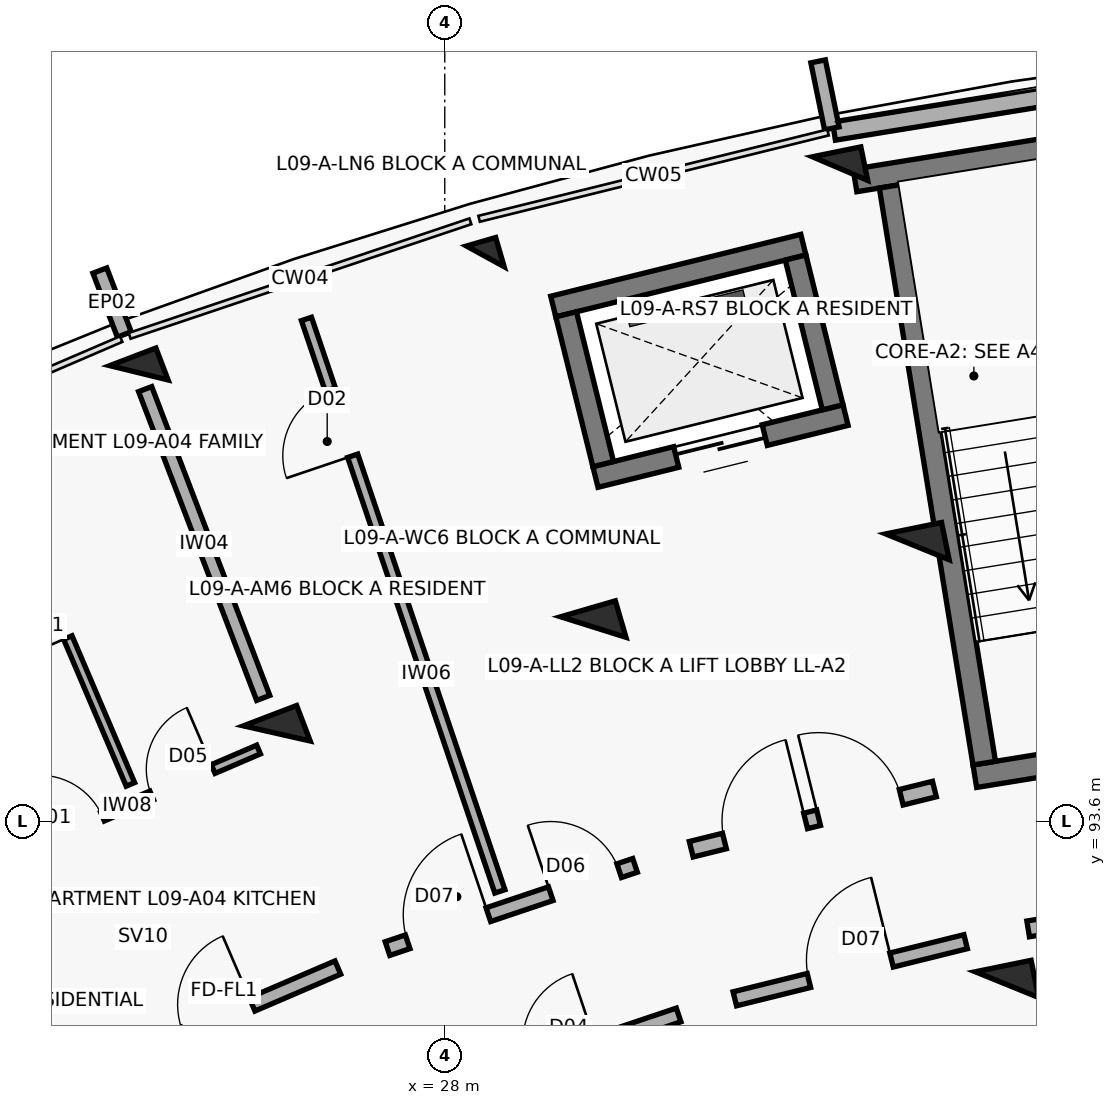
"""IFC4 building model, lengths in metres.
Left out: names, types, materials, properties, quantities, classifications, styles, units other than length and angle.
Written with IfcOpenShell. Run it as: python <this file> out.ifc"""

import sys

from ifc_helpers import new_model, si_unit, direction, frame, frame_2d, origin, origin_2d, place, context, subcontext, project, spatial, rectangle, extrude, element, fill, save


model = new_model("IFC4")
c1 = context("Model", 3, precision=1e-05, world=origin(), true_north=direction((0.0, 1.0)))
c2 = subcontext(c1, "Body", "Model", "MODEL_VIEW")
j1 = project(units=[si_unit("LENGTHUNIT", "METRE"), si_unit("PLANEANGLEUNIT", "RADIAN")], contexts=[c1])
p1 = place(None, origin())
s1 = spatial("IfcSite", under=j1, at=p1, CompositionType="ELEMENT")
p2 = place(p1, origin())
s2 = spatial("IfcBuilding", under=s1, at=p2, CompositionType="ELEMENT")
p3 = place(p2, frame((0.0, 0.0, 29.8)))
s3 = spatial("IfcBuildingStorey", under=s2, at=p3, CompositionType="ELEMENT", Elevation=29.8)
p4 = place(p3, frame((25.79, 94.753, 0.0), z_axis=(0.0, 0.0, 1.0), x_axis=(-0.357064076459, 0.934079892355, 0.0)))
e1 = element("IfcColumn", 1, at=p4, inside=s3, PredefinedType="COLUMN", context=c2, shape_type="SweptSolid", body=[
    extrude(rectangle(XDim=0.5, YDim=0.75, at=origin_2d()), origin(), (0.0, 0.0, 1.0), 3.1),
])
p5 = place(p3, frame((23.976, 99.499, 0.0), z_axis=(0.0, 0.0, 1.0), x_axis=(-0.357064076459, 0.934079892355, 0.0)))
e2 = element("IfcColumn", 2, at=p5, inside=s3, PredefinedType="COLUMN", context=c2, shape_type="SweptSolid", body=[
    extrude(rectangle(XDim=0.45, YDim=0.65, at=origin_2d()), origin(), (0.0, 0.0, 1.0), 3.1),
])
p6 = place(p3, frame((29.954, 96.153, 0.0), z_axis=(0.0, 0.0, 1.0), x_axis=(-0.27966144946, 0.96009867914, 0.0)))
e3 = element("IfcColumn", 3, at=p6, inside=s3, PredefinedType="COLUMN", context=c2, shape_type="SweptSolid", body=[
    extrude(rectangle(XDim=0.5, YDim=0.75, at=origin_2d()), origin(), (0.0, 0.0, 1.0), 3.1),
])
p7 = place(p3, frame((28.533, 101.031, 0.0), z_axis=(0.0, 0.0, 1.0), x_axis=(-0.27966144946, 0.96009867914, 0.0)))
e4 = element("IfcColumn", 4, at=p7, inside=s3, PredefinedType="COLUMN", context=c2, shape_type="SweptSolid", body=[
    extrude(rectangle(XDim=0.4, YDim=0.4, at=origin_2d()), origin(), (0.0, 0.0, 1.0), 3.1),
])
for number, where, z_axis, x_axis in (
    (5, (35.397, 91.448, 0.0), (0.0, 0.0, 1.0), (-0.2, 0.98, 0.0)),
    (6, (34.219, 97.209, 0.0), (0.0, 0.0, 1.0), (-0.2, 0.98, 0.0)),
):
    element("IfcColumn", number, at=place(p3, frame(where, z_axis=z_axis, x_axis=x_axis)), inside=s3, PredefinedType="COLUMN", context=c2, shape_type="SweptSolid", body=[
        extrude(rectangle(XDim=0.5, YDim=0.75, at=origin_2d()), origin(), (0.0, 0.0, 1.0), 3.1),
    ])
p8 = place(p3, frame((33.201, 102.186, 0.0), z_axis=(0.0, 0.0, 1.0), x_axis=(-0.200393999665, 0.979715389742, 0.0)))
e7 = element("IfcColumn", 7, at=p8, inside=s3, PredefinedType="COLUMN", context=c2, shape_type="SweptSolid", body=[
    extrude(rectangle(XDim=0.45, YDim=0.65, at=origin_2d()), origin(), (0.0, 0.0, 1.0), 3.1),
])
p9 = place(p3, frame((23.783, 100.003, 0.0), z_axis=(0.0, 0.0, 1.0), x_axis=(-0.356942580168, 0.934126326823, 0.0)))
e8 = element("IfcWall", 8, at=p9, inside=s3, PredefinedType="PARAPET", context=c2, shape_type="SweptSolid", body=[
    extrude(rectangle(XDim=0.9, YDim=0.195, at=frame_2d((0.45, 0.0))), origin(), (0.0, 0.0, 1.0), 2.25),
])
p10 = place(p3, frame((33.12, 102.679, 0.0), z_axis=(0.0, 0.0, 1.0), x_axis=(0.987080750493, 0.160223568819, 0.0)))
e9 = element("IfcWall", 9, at=p10, inside=s3, PredefinedType="SOLIDWALL", context=c2, shape_type="SweptSolid", body=[
    extrude(rectangle(XDim=4.809, YDim=0.242, at=frame_2d((2.404, 0.0))), origin(), (0.0, 0.0, 1.0), 2.25),
])
p11 = place(p3, frame((33.093, 102.715, 0.0), z_axis=(0.0, 0.0, 1.0), x_axis=(-0.200183211319, 0.979758481416, 0.0)))
e10 = element("IfcWall", 10, at=p11, inside=s3, PredefinedType="PARAPET", context=c2, shape_type="SweptSolid", body=[
    extrude(rectangle(XDim=0.9, YDim=0.195, at=frame_2d((0.45, 0.0))), origin(), (0.0, 0.0, 1.0), 2.25),
])
p12 = place(p3, frame((38.794, 94.811, 0.0), z_axis=(0.0, 0.0, 1.0), x_axis=(-0.987077443397, -0.160243941341, 0.0)))
e11 = element("IfcWall", 11, at=p12, inside=s3, PredefinedType="SHEAR", context=c2, shape_type="SweptSolid", body=[
    extrude(rectangle(XDim=3.87, YDim=0.3, at=frame_2d((1.935, 0.0))), origin(), (0.0, 0.0, 1.0), 3.1),
])
p13 = place(p12, frame((1.435, 0.0, 0.0)))
e12 = element("IfcOpeningElement", 12, at=p13, cuts=e11, PredefinedType="OPENING", context=c2, shape_type="SweptSolid", body=[
    extrude(rectangle(XDim=1.0, YDim=2.15, at=frame_2d((0.5, 1.075))), frame((0.0, 0.16, 0.0), z_axis=(0.0, -1.0, 0.0), x_axis=(1.0, 0.0, 0.0)), (0.0, 0.0, 1.0), 0.32),
])
p14 = place(p3, frame((37.81, 102.745, 0.0), z_axis=(0.0, 0.0, 1.0), x_axis=(-0.987084710126, -0.160199173019, 0.0)))
e13 = element("IfcWall", 13, at=p14, inside=s3, PredefinedType="SHEAR", context=c2, shape_type="SweptSolid", body=[
    extrude(rectangle(XDim=4.47, YDim=0.3, at=frame_2d((2.235, 0.0))), origin(), (0.0, 0.0, 1.0), 3.1),
])
p15 = place(p3, frame((35.098, 94.363, 0.0), z_axis=(0.0, 0.0, 1.0), x_axis=(-0.160227496777, 0.987080112897, 0.0)))
e14 = element("IfcWall", 14, at=p15, inside=s3, PredefinedType="SHEAR", context=c2, shape_type="SweptSolid", body=[
    extrude(rectangle(XDim=7.69, YDim=0.3, at=frame_2d((3.845, 0.0))), origin(), (0.0, 0.0, 1.0), 3.1),
])
p16 = place(p3, frame((33.273, 98.942, 0.0), z_axis=(0.0, 0.0, 1.0), x_axis=(-0.970707542441, -0.240264160972, 0.0)))
e15 = element("IfcWall", 15, at=p16, inside=s3, PredefinedType="SHEAR", context=c2, shape_type="SweptSolid", body=[
    extrude(rectangle(XDim=3.39, YDim=0.28, at=frame_2d((1.695, 0.0))), origin(), (0.0, 0.0, 1.0), 3.1),
])
p17 = place(p16, frame((1.095, 0.0, 0.0)))
e16 = element("IfcOpeningElement", 16, at=p17, cuts=e15, PredefinedType="OPENING", context=c2, shape_type="SweptSolid", body=[
    extrude(rectangle(XDim=1.2, YDim=2.15, at=frame_2d((0.6, 1.075))), frame((0.0, 0.15, 0.0), z_axis=(0.0, -1.0, 0.0), x_axis=(1.0, 0.0, 0.0)), (0.0, 0.0, 1.0), 0.3),
])
p18 = place(p3, frame((32.718, 101.185, 0.0), z_axis=(0.0, 0.0, 1.0), x_axis=(-0.970711699588, -0.240247364777, 0.0)))
e17 = element("IfcWall", 17, at=p18, inside=s3, PredefinedType="SHEAR", context=c2, shape_type="SweptSolid", body=[
    extrude(rectangle(XDim=3.39, YDim=0.28, at=frame_2d((1.695, 0.0))), origin(), (0.0, 0.0, 1.0), 3.1),
])
p19 = place(p3, frame((33.104, 99.044, 0.0), z_axis=(0.0, 0.0, 1.0), x_axis=(-0.240186044774, 0.970726873995, 0.0)))
e18 = element("IfcWall", 18, at=p19, inside=s3, PredefinedType="SHEAR", context=c2, shape_type="SweptSolid", body=[
    extrude(rectangle(XDim=2.03, YDim=0.28, at=frame_2d((1.015, 0.0))), origin(), (0.0, 0.0, 1.0), 3.1),
])
p20 = place(p3, frame((30.085, 98.297, 0.0), z_axis=(0.0, 0.0, 1.0), x_axis=(-0.2402993748, 0.970698825832, 0.0)))
e19 = element("IfcWall", 19, at=p20, inside=s3, PredefinedType="SHEAR", context=c2, shape_type="SweptSolid", body=[
    extrude(rectangle(XDim=2.03, YDim=0.28, at=frame_2d((1.015, 0.0))), origin(), (0.0, 0.0, 1.0), 3.1),
])
p21 = place(p3, frame((23.437, 90.316, 0.0), z_axis=(0.0, 0.0, 1.0), x_axis=(0.918718172399, 0.394913813008, 0.0)))
e20 = element("IfcWall", 20, at=p21, inside=s3, PredefinedType="SOLIDWALL", context=c2, shape_type="SweptSolid", body=[
    extrude(rectangle(XDim=3.436, YDim=0.19, at=frame_2d((1.718, 0.0))), origin(), (0.0, 0.0, 1.0), 2.08),
])
p22 = place(p21, frame((1.228, 0.0, 0.0)))
e21 = element("IfcOpeningElement", 21, at=p22, cuts=e20, PredefinedType="OPENING", context=c2, shape_type="SweptSolid", body=[
    extrude(rectangle(XDim=0.98, YDim=2.15, at=frame_2d((0.49, 1.075))), frame((0.0, 0.105, 0.0), z_axis=(0.0, -1.0, 0.0), x_axis=(1.0, 0.0, 0.0)), (0.0, 0.0, 1.0), 0.21),
])
p23 = place(p3, frame((22.073, 93.047, 0.0), z_axis=(0.0, 0.0, 1.0), x_axis=(0.918737522346, 0.394868794707, 0.0)))
e22 = element("IfcWall", 22, at=p23, inside=s3, PredefinedType="PARTITIONING", context=c2, shape_type="SweptSolid", body=[
    extrude(rectangle(XDim=3.785, YDim=0.125, at=frame_2d((1.893, 0.0))), origin(), (0.0, 0.0, 1.0), 2.08),
])
p24 = place(p23, frame((0.65, 0.0, 0.0)))
e23 = element("IfcOpeningElement", 23, at=p24, cuts=e22, PredefinedType="OPENING", context=c2, shape_type="SweptSolid", body=[
    extrude(rectangle(XDim=0.9, YDim=2.1, at=frame_2d((0.45, 1.05))), frame((0.0, 0.073, 0.0), z_axis=(0.0, -1.0, 0.0), x_axis=(1.0, 0.0, 0.0)), (0.0, 0.0, 1.0), 0.145),
])
p25 = place(p23, frame((2.255, 0.0, 0.0)))
e24 = element("IfcOpeningElement", 24, at=p25, cuts=e22, PredefinedType="OPENING", context=c2, shape_type="SweptSolid", body=[
    extrude(rectangle(XDim=0.88, YDim=2.1, at=frame_2d((0.44, 1.05))), frame((0.0, 0.073, 0.0), z_axis=(0.0, -1.0, 0.0), x_axis=(1.0, 0.0, 0.0)), (0.0, 0.0, 1.0), 0.145),
])
p26 = place(p3, frame((23.864, 94.083, 0.0), z_axis=(0.0, 0.0, 1.0), x_axis=(-0.392109841969, 0.919918404985, 0.0)))
e25 = element("IfcWall", 25, at=p26, inside=s3, PredefinedType="PARTITIONING", context=c2, shape_type="SweptSolid", body=[
    extrude(rectangle(XDim=5.05, YDim=0.12, at=frame_2d((2.525, 0.0))), origin(), (0.0, 0.0, 1.0), 2.08),
])
p27 = place(p26, frame((2.1, 0.0, 0.0)))
e26 = element("IfcOpeningElement", 26, at=p27, cuts=e25, PredefinedType="OPENING", context=c2, shape_type="SweptSolid", body=[
    extrude(rectangle(XDim=0.85, YDim=2.1, at=frame_2d((0.425, 1.05))), frame((0.0, 0.07, 0.0), z_axis=(0.0, -1.0, 0.0), x_axis=(1.0, 0.0, 0.0)), (0.0, 0.0, 1.0), 0.14),
])
p28 = place(p3, frame((27.247, 91.923, 0.0), z_axis=(0.0, 0.0, 1.0), x_axis=(0.947863007629, 0.318678080151, 0.0)))
e27 = element("IfcWall", 27, at=p28, inside=s3, PredefinedType="SOLIDWALL", context=c2, shape_type="SweptSolid", body=[
    extrude(rectangle(XDim=3.436, YDim=0.19, at=frame_2d((1.718, 0.0))), origin(), (0.0, 0.0, 1.0), 2.08),
])
p29 = place(p28, frame((0.28, 0.0, 0.0)))
e28 = element("IfcOpeningElement", 28, at=p29, cuts=e27, PredefinedType="OPENING", context=c2, shape_type="SweptSolid", body=[
    extrude(rectangle(XDim=1.12, YDim=2.15, at=frame_2d((0.56, 1.075))), frame((0.0, 0.105, 0.0), z_axis=(0.0, -1.0, 0.0), x_axis=(1.0, 0.0, 0.0)), (0.0, 0.0, 1.0), 0.21),
])
p30 = place(p28, frame((2.266, 0.0, 0.0)))
e29 = element("IfcOpeningElement", 29, at=p30, cuts=e27, PredefinedType="OPENING", context=c2, shape_type="SweptSolid", body=[
    extrude(rectangle(XDim=0.95, YDim=2.1, at=frame_2d((0.475, 1.05))), frame((0.0, 0.105, 0.0), z_axis=(0.0, -1.0, 0.0), x_axis=(1.0, 0.0, 0.0)), (0.0, 0.0, 1.0), 0.21),
])
p31 = place(p3, frame((27.979, 90.008, 0.0), z_axis=(0.0, 0.0, 1.0), x_axis=(0.94787351033, 0.318646839643, 0.0)))
e30 = element("IfcWall", 30, at=p31, inside=s3, PredefinedType="SOLIDWALL", context=c2, shape_type="SweptSolid", body=[
    extrude(rectangle(XDim=3.269, YDim=0.19, at=frame_2d((1.634, 0.0))), origin(), (0.0, 0.0, 1.0), 2.08),
])
p32 = place(p31, frame((1.154, 0.0, 0.0)))
e31 = element("IfcOpeningElement", 31, at=p32, cuts=e30, PredefinedType="OPENING", context=c2, shape_type="SweptSolid", body=[
    extrude(rectangle(XDim=0.96, YDim=2.1, at=frame_2d((0.48, 1.05))), frame((0.0, 0.105, 0.0), z_axis=(0.0, -1.0, 0.0), x_axis=(1.0, 0.0, 0.0)), (0.0, 0.0, 1.0), 0.21),
])
p33 = place(p3, frame((28.725, 92.675, 0.0), z_axis=(0.0, 0.0, 1.0), x_axis=(-0.320057771325, 0.947398027766, 0.0)))
e32 = element("IfcWall", 32, at=p33, inside=s3, PredefinedType="PARTITIONING", context=c2, shape_type="SweptSolid", body=[
    extrude(rectangle(XDim=7.95, YDim=0.14, at=frame_2d((3.975, 0.0))), origin(), (0.0, 0.0, 1.0), 2.08),
])
p34 = place(p33, frame((6.05, 0.0, 0.0)))
e33 = element("IfcOpeningElement", 33, at=p34, cuts=e32, PredefinedType="OPENING", context=c2, shape_type="SweptSolid", body=[
    extrude(rectangle(XDim=0.92, YDim=2.1, at=frame_2d((0.46, 1.05))), frame((0.0, 0.08, 0.0), z_axis=(0.0, -1.0, 0.0), x_axis=(1.0, 0.0, 0.0)), (0.0, 0.0, 1.0), 0.16),
])
p35 = place(p3, frame((25.611, 95.22, 0.0), z_axis=(0.0, 0.0, 1.0), x_axis=(-0.357064016205, 0.934079915388, 0.0)))
e34 = element("IfcWall", 34, at=p35, inside=s3, PredefinedType="SOLIDWALL", context=c2, shape_type="SweptSolid", body=[
    extrude(rectangle(XDim=4.35, YDim=0.185, at=frame_2d((2.175, 0.0))), origin(), (0.0, 0.0, 1.0), 2.08),
])
p36 = place(p3, frame((31.243, 93.23, 0.0), z_axis=(0.0, 0.0, 1.0), x_axis=(0.970719238682, 0.240216901263, 0.0)))
e35 = element("IfcWall", 35, at=p36, inside=s3, PredefinedType="SOLIDWALL", context=c2, shape_type="SweptSolid", body=[
    extrude(rectangle(XDim=3.296, YDim=0.21, at=frame_2d((1.648, 0.0))), origin(), (0.0, 0.0, 1.0), 2.08),
])
p37 = place(p36, frame((0.45, 0.0, 0.0)))
e36 = element("IfcOpeningElement", 36, at=p37, cuts=e35, PredefinedType="OPENING", context=c2, shape_type="SweptSolid", body=[
    extrude(rectangle(XDim=1.1, YDim=2.15, at=frame_2d((0.55, 1.075))), frame((0.0, 0.115, 0.0), z_axis=(0.0, -1.0, 0.0), x_axis=(1.0, 0.0, 0.0)), (0.0, 0.0, 1.0), 0.23),
])
p38 = place(p36, frame((1.726, 0.0, 0.0)))
e37 = element("IfcOpeningElement", 37, at=p38, cuts=e35, PredefinedType="OPENING", context=c2, shape_type="SweptSolid", body=[
    extrude(rectangle(XDim=1.12, YDim=2.15, at=frame_2d((0.56, 1.075))), frame((0.0, 0.115, 0.0), z_axis=(0.0, -1.0, 0.0), x_axis=(1.0, 0.0, 0.0)), (0.0, 0.0, 1.0), 0.23),
])
p39 = place(p3, frame((31.816, 91.262, 0.0), z_axis=(0.0, 0.0, 1.0), x_axis=(0.970727194092, 0.240184751078, 0.0)))
e38 = element("IfcWall", 38, at=p39, inside=s3, PredefinedType="SOLIDWALL", context=c2, shape_type="SweptSolid", body=[
    extrude(rectangle(XDim=3.129, YDim=0.19, at=frame_2d((1.564, 0.0))), origin(), (0.0, 0.0, 1.0), 2.08),
])
p40 = place(p39, frame((1.004, 0.0, 0.0)))
e39 = element("IfcOpeningElement", 39, at=p40, cuts=e38, PredefinedType="OPENING", context=c2, shape_type="SweptSolid", body=[
    extrude(rectangle(XDim=1.12, YDim=2.15, at=frame_2d((0.56, 1.075))), frame((0.0, 0.105, 0.0), z_axis=(0.0, -1.0, 0.0), x_axis=(1.0, 0.0, 0.0)), (0.0, 0.0, 1.0), 0.21),
])
p41 = place(p3, frame((35.676, 92.181, 0.0), z_axis=(0.0, 0.0, 1.0), x_axis=(0.98707079686, 0.160284877599, 0.0)))
e40 = element("IfcWall", 40, at=p41, inside=s3, PredefinedType="SOLIDWALL", context=c2, shape_type="SweptSolid", body=[
    extrude(rectangle(XDim=3.129, YDim=0.21, at=frame_2d((1.564, 0.0))), origin(), (0.0, 0.0, 1.0), 2.08),
])
p42 = place(p41, frame((1.014, 0.0, 0.0)))
e41 = element("IfcOpeningElement", 41, at=p42, cuts=e40, PredefinedType="OPENING", context=c2, shape_type="SweptSolid", body=[
    extrude(rectangle(XDim=1.1, YDim=2.15, at=frame_2d((0.55, 1.075))), frame((0.0, 0.115, 0.0), z_axis=(0.0, -1.0, 0.0), x_axis=(1.0, 0.0, 0.0)), (0.0, 0.0, 1.0), 0.23),
])
p43 = place(p17, origin())
e42 = element("IfcDoor", 42, at=p43, inside=s3, OperationType="DOUBLE_DOOR_SLIDING", PredefinedType="DOOR", context=c2, shape_type="SweptSolid", body=[
    extrude(rectangle(XDim=1.2, YDim=2.15, at=frame_2d((0.6, 1.075))), frame((0.0, 0.025, 0.0), z_axis=(0.0, -1.0, 0.0), x_axis=(1.0, 0.0, 0.0)), (0.0, 0.0, 1.0), 0.05),
])
fill(e16, e42)
p44 = place(p22, origin())
e43 = element("IfcDoor", 43, at=p44, inside=s3, OperationType="SINGLE_SWING_RIGHT", PredefinedType="DOOR", context=c2, shape_type="SweptSolid", body=[
    extrude(rectangle(XDim=0.98, YDim=2.15, at=frame_2d((0.49, 1.075))), frame((0.0, 0.025, 0.0), z_axis=(0.0, -1.0, 0.0), x_axis=(1.0, 0.0, 0.0)), (0.0, 0.0, 1.0), 0.05),
])
fill(e21, e43)
p45 = place(p24, origin())
e44 = element("IfcDoor", 44, at=p45, inside=s3, OperationType="SINGLE_SWING_LEFT", PredefinedType="DOOR", context=c2, shape_type="SweptSolid", body=[
    extrude(rectangle(XDim=0.9, YDim=2.1, at=frame_2d((0.45, 1.05))), frame((0.0, 0.025, 0.0), z_axis=(0.0, -1.0, 0.0), x_axis=(1.0, 0.0, 0.0)), (0.0, 0.0, 1.0), 0.05),
])
fill(e23, e44)
p46 = place(p25, origin())
e45 = element("IfcDoor", 45, at=p46, inside=s3, OperationType="SINGLE_SWING_RIGHT", PredefinedType="DOOR", context=c2, shape_type="SweptSolid", body=[
    extrude(rectangle(XDim=0.88, YDim=2.1, at=frame_2d((0.44, 1.05))), frame((0.0, 0.025, 0.0), z_axis=(0.0, -1.0, 0.0), x_axis=(1.0, 0.0, 0.0)), (0.0, 0.0, 1.0), 0.05),
])
fill(e24, e45)
p47 = place(p27, origin())
e46 = element("IfcDoor", 46, at=p47, inside=s3, OperationType="SINGLE_SWING_LEFT", PredefinedType="DOOR", context=c2, shape_type="SweptSolid", body=[
    extrude(rectangle(XDim=0.85, YDim=2.1, at=frame_2d((0.425, 1.05))), frame((0.0, 0.025, 0.0), z_axis=(0.0, -1.0, 0.0), x_axis=(1.0, 0.0, 0.0)), (0.0, 0.0, 1.0), 0.05),
])
fill(e26, e46)
p48 = place(p29, origin())
e47 = element("IfcDoor", 47, at=p48, inside=s3, OperationType="SINGLE_SWING_RIGHT", PredefinedType="DOOR", context=c2, shape_type="SweptSolid", body=[
    extrude(rectangle(XDim=1.12, YDim=2.15, at=frame_2d((0.56, 1.075))), frame((0.0, 0.025, 0.0), z_axis=(0.0, -1.0, 0.0), x_axis=(1.0, 0.0, 0.0)), (0.0, 0.0, 1.0), 0.05),
])
fill(e28, e47)
p49 = place(p30, origin())
e48 = element("IfcDoor", 48, at=p49, inside=s3, OperationType="SINGLE_SWING_LEFT", PredefinedType="DOOR", context=c2, shape_type="SweptSolid", body=[
    extrude(rectangle(XDim=0.95, YDim=2.1, at=frame_2d((0.475, 1.05))), frame((0.0, 0.025, 0.0), z_axis=(0.0, -1.0, 0.0), x_axis=(1.0, 0.0, 0.0)), (0.0, 0.0, 1.0), 0.05),
])
fill(e29, e48)
p50 = place(p34, origin())
e49 = element("IfcDoor", 49, at=p50, inside=s3, OperationType="SINGLE_SWING_LEFT", PredefinedType="DOOR", context=c2, shape_type="SweptSolid", body=[
    extrude(rectangle(XDim=0.92, YDim=2.1, at=frame_2d((0.46, 1.05))), frame((0.0, 0.025, 0.0), z_axis=(0.0, -1.0, 0.0), x_axis=(1.0, 0.0, 0.0)), (0.0, 0.0, 1.0), 0.05),
])
fill(e33, e49)
p51 = place(p37, origin())
e50 = element("IfcDoor", 50, at=p51, inside=s3, OperationType="SINGLE_SWING_RIGHT", PredefinedType="DOOR", context=c2, shape_type="SweptSolid", body=[
    extrude(rectangle(XDim=1.1, YDim=2.15, at=frame_2d((0.55, 1.075))), frame((0.0, 0.025, 0.0), z_axis=(0.0, -1.0, 0.0), x_axis=(1.0, 0.0, 0.0)), (0.0, 0.0, 1.0), 0.05),
])
fill(e36, e50)
p52 = place(p38, origin())
e51 = element("IfcDoor", 51, at=p52, inside=s3, OperationType="SINGLE_SWING_LEFT", PredefinedType="DOOR", context=c2, shape_type="SweptSolid", body=[
    extrude(rectangle(XDim=1.12, YDim=2.15, at=frame_2d((0.56, 1.075))), frame((0.0, 0.025, 0.0), z_axis=(0.0, -1.0, 0.0), x_axis=(1.0, 0.0, 0.0)), (0.0, 0.0, 1.0), 0.05),
])
fill(e37, e51)
p53 = place(p40, origin())
e52 = element("IfcDoor", 52, at=p53, inside=s3, OperationType="SINGLE_SWING_RIGHT", PredefinedType="DOOR", context=c2, shape_type="SweptSolid", body=[
    extrude(rectangle(XDim=1.12, YDim=2.15, at=frame_2d((0.56, 1.075))), frame((0.0, 0.025, 0.0), z_axis=(0.0, -1.0, 0.0), x_axis=(1.0, 0.0, 0.0)), (0.0, 0.0, 1.0), 0.05),
])
fill(e39, e52)
save(model, sys.argv[1])
